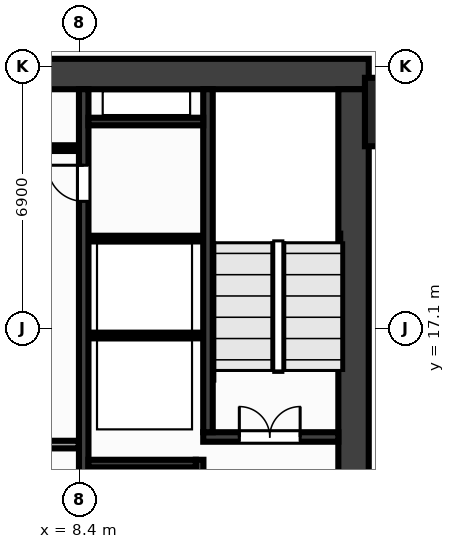
"""IFC4 building model, lengths in metres.
Left out: names, types, materials, properties, quantities, classifications, styles, units other than length and angle.
Written with IfcOpenShell. Run it as: python <this file> out.ifc"""

import sys

from ifc_helpers import new_model, si_unit, direction, frame, frame_2d, origin, origin_2d, place, context, subcontext, project, spatial, rectangle, extrude, source, transform, mapped, element, fill, save


model = new_model("IFC4")
c1 = context("Model", 3, precision=1e-05, world=origin(), true_north=direction((0.0, 1.0)))
c2 = subcontext(c1, "Body", "Model", "MODEL_VIEW")
j1 = project(units=[si_unit("LENGTHUNIT", "METRE"), si_unit("PLANEANGLEUNIT", "RADIAN")], contexts=[c1])
p1 = place(None, origin())
s1 = spatial("IfcSite", under=j1, at=p1, CompositionType="ELEMENT")
p2 = place(p1, origin())
s2 = spatial("IfcBuilding", under=s1, at=p2, CompositionType="ELEMENT")
p3 = place(p2, frame((0.0, 0.0, 18.95)))
s3 = spatial("IfcBuildingStorey", under=s2, at=p3, CompositionType="ELEMENT", Elevation=18.95)
m1 = source(origin(), c2, "Body", "SweptSolid", [
    extrude(rectangle(XDim=32.0, YDim=0.8, at=frame_2d((16.0, 0.0))), origin(), (0.0, 0.0, 1.0), 4.65),
])
p4 = place(p3, frame((-16.0, 23.8, 0.0), z_axis=(0.0, 0.0, 1.0), x_axis=(1.0, 0.0, 0.0)))
e1 = element("IfcWall", 1, at=p4, inside=s3, PredefinedType="SHEAR", context=c2, shape_type="MappedRepresentation", body=[
    mapped(m1, transform((0.0, 0.0, 0.0), x_axis=(1.0, 0.0, 0.0), y_axis=(0.0, 1.0, 0.0), z_axis=(0.0, 0.0, 1.0), scale=1.0)),
])
m2 = source(origin(), c2, "Body", "SweptSolid", [
    extrude(rectangle(XDim=12.8, YDim=0.8, at=frame_2d((6.4, 0.0))), origin(), (0.0, 0.0, 1.0), 4.65),
])
p5 = place(p3, frame((15.6, 10.6, 0.0), z_axis=(0.0, 0.0, 1.0), x_axis=(0.0, 1.0, 0.0)))
e2 = element("IfcWall", 2, at=p5, inside=s3, PredefinedType="SHEAR", context=c2, shape_type="MappedRepresentation", body=[
    mapped(m2, transform((0.0, 0.0, 0.0), x_axis=(1.0, 0.0, 0.0), y_axis=(0.0, 1.0, 0.0), z_axis=(0.0, 0.0, 1.0), scale=1.0)),
])
m3 = source(origin(), c2, "Body", "SweptSolid", [
    extrude(rectangle(XDim=12.8, YDim=0.25, at=frame_2d((6.4, 0.0))), origin(), (0.0, 0.0, 1.0), 4.65),
])
p6 = place(p3, frame((8.5, 10.6, 0.0), z_axis=(0.0, 0.0, 1.0), x_axis=(0.0, 1.0, 0.0)))
e3 = element("IfcWall", 3, at=p6, inside=s3, PredefinedType="SHEAR", context=c2, shape_type="MappedRepresentation", body=[
    mapped(m3, transform((0.0, 0.0, 0.0), x_axis=(1.0, 0.0, 0.0), y_axis=(0.0, 1.0, 0.0), z_axis=(0.0, 0.0, 1.0), scale=1.0)),
])
p7 = place(p6, frame((9.85, 0.0, 0.0)))
e4 = element("IfcOpeningElement", 4, at=p7, cuts=e3, PredefinedType="OPENING", context=c2, shape_type="SweptSolid", body=[
    extrude(rectangle(XDim=0.95, YDim=2.15, at=frame_2d((0.475, 1.075))), frame((0.0, 0.137, 0.0), z_axis=(0.0, -1.0, 0.0), x_axis=(1.0, 0.0, 0.0)), (0.0, 0.0, 1.0), 0.274),
])
m4 = source(origin(), c2, "Body", "SweptSolid", [
    extrude(rectangle(XDim=3.555, YDim=0.25, at=frame_2d((1.777, 0.0))), origin(), (0.0, 0.0, 1.0), 4.65),
])
p8 = place(p3, frame((11.645, 14.25, 0.0), z_axis=(0.0, 0.0, 1.0), x_axis=(1.0, 0.0, 0.0)))
e5 = element("IfcWall", 5, at=p8, inside=s3, PredefinedType="SHEAR", context=c2, shape_type="MappedRepresentation", body=[
    mapped(m4, transform((0.0, 0.0, 0.0), x_axis=(1.0, 0.0, 0.0), y_axis=(0.0, 1.0, 0.0), z_axis=(0.0, 0.0, 1.0), scale=1.0)),
])
p9 = place(p8, frame((0.95, 0.0, 0.0)))
e6 = element("IfcOpeningElement", 6, at=p9, cuts=e5, PredefinedType="OPENING", context=c2, shape_type="SweptSolid", body=[
    extrude(rectangle(XDim=1.6, YDim=2.15, at=frame_2d((0.8, 1.075))), frame((0.0, 0.137, 0.0), z_axis=(0.0, -1.0, 0.0), x_axis=(1.0, 0.0, 0.0)), (0.0, 0.0, 1.0), 0.274),
])
m5 = source(origin(), c2, "Body", "SweptSolid", [
    extrude(rectangle(XDim=9.025, YDim=0.25, at=frame_2d((4.512, 0.0))), origin(), (0.0, 0.0, 1.0), 4.65),
])
p10 = place(p3, frame((11.77, 14.375, 0.0), z_axis=(0.0, 0.0, 1.0), x_axis=(0.0, 1.0, 0.0)))
e7 = element("IfcWall", 7, at=p10, inside=s3, PredefinedType="SHEAR", context=c2, shape_type="MappedRepresentation", body=[
    mapped(m5, transform((0.0, 0.0, 0.0), x_axis=(1.0, 0.0, 0.0), y_axis=(0.0, 1.0, 0.0), z_axis=(0.0, 0.0, 1.0), scale=1.0)),
])
m6 = source(origin(), c2, "Body", "SweptSolid", [
    extrude(rectangle(XDim=3.05, YDim=0.2, at=frame_2d((1.525, 0.0))), origin(), (0.0, 0.0, 1.0), 4.65),
])
p11 = place(p3, frame((11.55, 10.6, 0.0), z_axis=(0.0, 0.0, 1.0), x_axis=(0.0, 1.0, 0.0)))
e8 = element("IfcWall", 8, at=p11, inside=s3, PredefinedType="SHEAR", context=c2, shape_type="MappedRepresentation", body=[
    mapped(m6, transform((0.0, 0.0, 0.0), x_axis=(1.0, 0.0, 0.0), y_axis=(0.0, 1.0, 0.0), z_axis=(0.0, 0.0, 1.0), scale=1.0)),
])
p12 = place(p11, frame((0.9, 0.0, 0.0)))
e9 = element("IfcOpeningElement", 9, at=p12, cuts=e8, PredefinedType="OPENING", context=c2, shape_type="SweptSolid", body=[
    extrude(rectangle(XDim=1.1, YDim=2.15, at=frame_2d((0.55, 1.075))), frame((0.0, 0.112, 0.0), z_axis=(0.0, -1.0, 0.0), x_axis=(1.0, 0.0, 0.0)), (0.0, 0.0, 1.0), 0.224),
])
m7 = source(origin(), c2, "Body", "SweptSolid", [
    extrude(rectangle(XDim=2.825, YDim=0.2, at=frame_2d((1.413, 0.0))), origin(), (0.0, 0.0, 1.0), 4.65),
])
p13 = place(p3, frame((8.625, 13.55, 0.0), z_axis=(0.0, 0.0, 1.0), x_axis=(1.0, 0.0, 0.0)))
e10 = element("IfcWall", 10, at=p13, inside=s3, PredefinedType="SHEAR", context=c2, shape_type="MappedRepresentation", body=[
    mapped(m7, transform((0.0, 0.0, 0.0), x_axis=(1.0, 0.0, 0.0), y_axis=(0.0, 1.0, 0.0), z_axis=(0.0, 0.0, 1.0), scale=1.0)),
])
m8 = source(origin(), c2, "Body", "SweptSolid", [
    extrude(rectangle(XDim=3.02, YDim=0.2, at=frame_2d((1.51, 0.0))), origin(), (0.0, 0.0, 1.0), 4.65),
])
p14 = place(p3, frame((8.625, 22.55, 0.0), z_axis=(0.0, 0.0, 1.0), x_axis=(1.0, 0.0, 0.0)))
e11 = element("IfcWall", 11, at=p14, inside=s3, PredefinedType="SHEAR", context=c2, shape_type="MappedRepresentation", body=[
    mapped(m8, transform((0.0, 0.0, 0.0), x_axis=(1.0, 0.0, 0.0), y_axis=(0.0, 1.0, 0.0), z_axis=(0.0, 0.0, 1.0), scale=1.0)),
])
m9 = source(origin(), c2, "Body", "SweptSolid", [
    extrude(rectangle(XDim=1.8, YDim=1.8, at=origin_2d()), origin(), (0.0, 0.0, 1.0), 4.65),
])
p15 = place(p3, frame((16.8, 22.8, 0.0), z_axis=(0.0, 0.0, 1.0), x_axis=(1.0, 0.0, 0.0)))
e12 = element("IfcColumn", 12, at=p15, inside=s3, PredefinedType="COLUMN", context=c2, shape_type="MappedRepresentation", body=[
    mapped(m9, transform((0.0, 0.0, 0.0), x_axis=(1.0, 0.0, 0.0), y_axis=(0.0, 1.0, 0.0), z_axis=(0.0, 0.0, 1.0), scale=1.0)),
])
m10 = source(origin(), c2, "Body", "SweptSolid", [
    extrude(rectangle(XDim=3.01, YDim=0.15, at=frame_2d((1.505, 0.0))), origin(), (0.0, 0.0, 1.0), 4.41),
])
for number, where, z_axis, x_axis in (
    (13, (8.63, 16.92, 0.0), (0.0, 0.0, 1.0), (1.0, 0.0, 0.0)),
    (14, (8.63, 19.47, 0.0), (0.0, 0.0, 1.0), (1.0, 0.0, 0.0)),
):
    element("IfcWall", number, at=place(p3, frame(where, z_axis=z_axis, x_axis=x_axis)), inside=s3, PredefinedType="PARTITIONING", context=c2, shape_type="MappedRepresentation", body=[
        mapped(m10, transform((0.0, 0.0, 0.0), x_axis=(1.0, 0.0, 0.0), y_axis=(0.0, 1.0, 0.0), z_axis=(0.0, 0.0, 1.0), scale=1.0)),
    ])
m11 = source(origin(), c2, "Body", "SweptSolid", [
    extrude(rectangle(XDim=7.07, YDim=0.2, at=frame_2d((3.535, 0.0))), origin(), (0.0, 0.0, 1.0), 4.41),
])
p16 = place(p3, frame((1.3, 14.05, 0.0), z_axis=(0.0, 0.0, 1.0), x_axis=(1.0, 0.0, 0.0)))
e15 = element("IfcWall", 15, at=p16, inside=s3, PredefinedType="PARTITIONING", context=c2, shape_type="MappedRepresentation", body=[
    mapped(m11, transform((0.0, 0.0, 0.0), x_axis=(1.0, 0.0, 0.0), y_axis=(0.0, 1.0, 0.0), z_axis=(0.0, 0.0, 1.0), scale=1.0)),
])
m12 = source(origin(), c2, "Body", "SweptSolid", [
    extrude(rectangle(XDim=2.07, YDim=0.15, at=frame_2d((1.035, 0.0))), origin(), (0.0, 0.0, 1.0), 4.41),
])
p17 = place(p3, frame((6.3, 21.85, 0.0), z_axis=(0.0, 0.0, 1.0), x_axis=(1.0, 0.0, 0.0)))
e16 = element("IfcWall", 16, at=p17, inside=s3, PredefinedType="PARTITIONING", context=c2, shape_type="MappedRepresentation", body=[
    mapped(m12, transform((0.0, 0.0, 0.0), x_axis=(1.0, 0.0, 0.0), y_axis=(0.0, 1.0, 0.0), z_axis=(0.0, 0.0, 1.0), scale=1.0)),
])
m13 = source(origin(), c2, "Body", "SweptSolid", [
    extrude(rectangle(XDim=1.6, YDim=2.15, at=frame_2d((0.8, 1.075))), frame((0.0, 0.025, 0.0), z_axis=(0.0, -1.0, 0.0), x_axis=(1.0, 0.0, 0.0)), (0.0, 0.0, 1.0), 0.05),
])
p18 = place(p9, origin())
e17 = element("IfcDoor", 17, at=p18, inside=s3, OperationType="DOUBLE_DOOR_SINGLE_SWING", PredefinedType="DOOR", context=c2, shape_type="MappedRepresentation", body=[
    mapped(m13, transform((0.0, 0.0, 0.0), x_axis=(1.0, 0.0, 0.0), y_axis=(0.0, 1.0, 0.0), z_axis=(0.0, 0.0, 1.0), scale=1.0)),
])
fill(e6, e17)
m14 = source(origin(), c2, "Body", "SweptSolid", [
    extrude(rectangle(XDim=0.95, YDim=2.15, at=frame_2d((0.475, 1.075))), frame((0.0, 0.025, 0.0), z_axis=(0.0, -1.0, 0.0), x_axis=(1.0, 0.0, 0.0)), (0.0, 0.0, 1.0), 0.05),
])
p19 = place(p7, origin())
e18 = element("IfcDoor", 18, at=p19, inside=s3, OperationType="SINGLE_SWING_RIGHT", PredefinedType="DOOR", context=c2, shape_type="MappedRepresentation", body=[
    mapped(m14, transform((0.0, 0.0, 0.0), x_axis=(1.0, 0.0, 0.0), y_axis=(0.0, 1.0, 0.0), z_axis=(0.0, 0.0, 1.0), scale=1.0)),
])
fill(e4, e18)
save(model, sys.argv[1])
